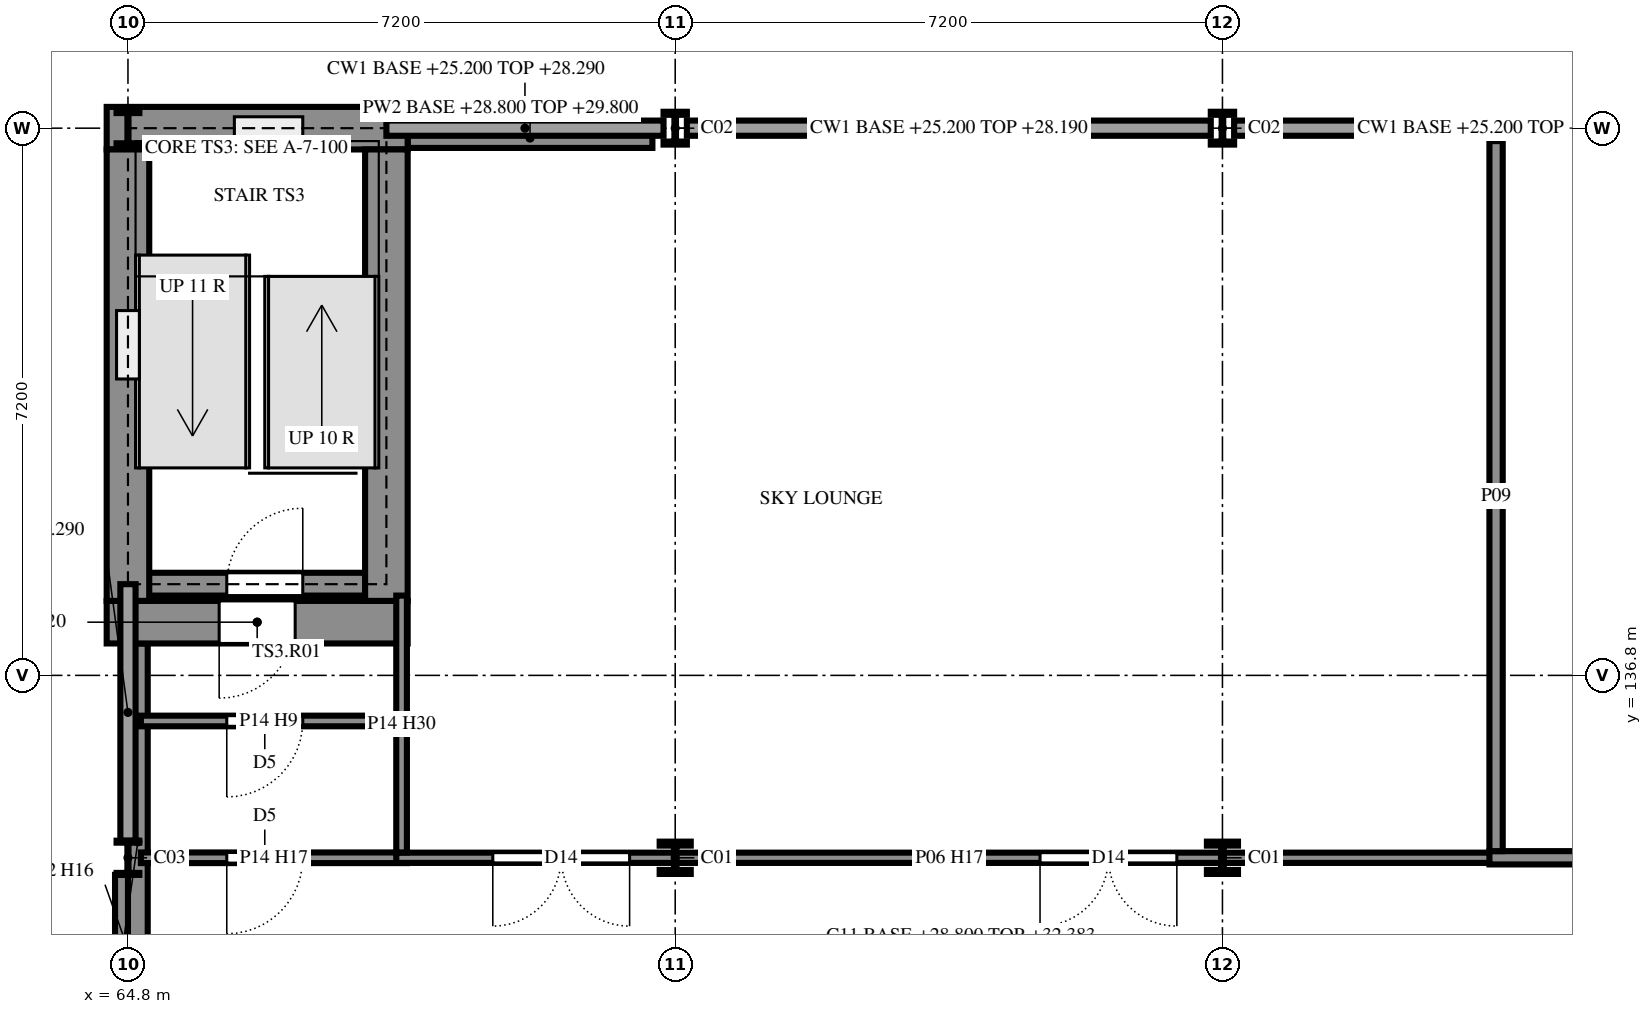
"""IFC4 building model, lengths in metres.
Left out: names, types, materials, properties, quantities, classifications, styles, units other than length and angle.
Written with IfcOpenShell. Run it as: python <this file> out.ifc"""

import sys

from ifc_helpers import new_model, si_unit, direction, frame, frame_2d, origin, origin_2d, place, context, subcontext, project, spatial, rectangle, i_section, extrude, element, fill, save


model = new_model("IFC4")
c1 = context("Model", 3, precision=1e-05, world=origin(), true_north=direction((0.0, 1.0)))
c2 = subcontext(c1, "Body", "Model", "MODEL_VIEW")
j1 = project(units=[si_unit("LENGTHUNIT", "METRE"), si_unit("PLANEANGLEUNIT", "RADIAN")], contexts=[c1])
p1 = place(None, origin())
s1 = spatial("IfcSite", under=j1, at=p1, CompositionType="ELEMENT")
p2 = place(p1, origin())
s2 = spatial("IfcBuilding", under=s1, at=p2, CompositionType="ELEMENT")
p3 = place(p2, frame((0.0, 0.0, 25.2)))
s3 = spatial("IfcBuildingStorey", under=s2, at=p3, CompositionType="ELEMENT", Elevation=25.2)
for number, where, z_axis, x_axis in (
    (1, (64.8, 134.4, 0.0), (0.0, 0.0, 1.0), (1.0, 0.0, 0.0)),
    (2, (64.8, 144.0, 0.0), (0.0, 0.0, 1.0), (1.0, 0.0, 0.0)),
):
    element("IfcColumn", number, at=place(p3, frame(where, z_axis=z_axis, x_axis=x_axis)), inside=s3, PredefinedType="COLUMN", context=c2, shape_type="SweptSolid", body=[
        extrude(i_section(OverallWidth=0.3, OverallDepth=0.45, WebThickness=0.014, FlangeThickness=0.026, FilletRadius=0.027, at=origin_2d()), origin(), (0.0, 0.0, 1.0), 3.6),
    ])
p4 = place(p3, frame((72.0, 134.4, 0.0), z_axis=(0.0, 0.0, 1.0), x_axis=(1.0, 0.0, 0.0)))
e3 = element("IfcColumn", 3, at=p4, inside=s3, PredefinedType="COLUMN", context=c2, shape_type="SweptSolid", body=[
    extrude(i_section(OverallWidth=0.409, OverallDepth=0.425, WebThickness=0.033, FlangeThickness=0.052, FilletRadius=0.015, at=origin_2d()), origin(), (0.0, 0.0, 1.0), 3.6),
])
p5 = place(p3, frame((72.0, 144.0, 0.0), z_axis=(0.0, 0.0, 1.0), x_axis=(1.0, 0.0, 0.0)))
e4 = element("IfcColumn", 4, at=p5, inside=s3, PredefinedType="COLUMN", context=c2, shape_type="SweptSolid", body=[
    extrude(i_section(OverallWidth=0.307, OverallDepth=0.432, WebThickness=0.021, FlangeThickness=0.04, FilletRadius=0.027, at=origin_2d()), origin(), (0.0, 0.0, 1.0), 3.6),
])
p6 = place(p3, frame((79.2, 134.4, 0.0), z_axis=(0.0, 0.0, 1.0), x_axis=(1.0, 0.0, 0.0)))
e5 = element("IfcColumn", 5, at=p6, inside=s3, PredefinedType="COLUMN", context=c2, shape_type="SweptSolid", body=[
    extrude(i_section(OverallWidth=0.409, OverallDepth=0.425, WebThickness=0.033, FlangeThickness=0.052, FilletRadius=0.015, at=origin_2d()), origin(), (0.0, 0.0, 1.0), 3.6),
])
p7 = place(p3, frame((79.2, 144.0, 0.0), z_axis=(0.0, 0.0, 1.0), x_axis=(1.0, 0.0, 0.0)))
e6 = element("IfcColumn", 6, at=p7, inside=s3, PredefinedType="COLUMN", context=c2, shape_type="SweptSolid", body=[
    extrude(i_section(OverallWidth=0.307, OverallDepth=0.432, WebThickness=0.021, FlangeThickness=0.04, FilletRadius=0.027, at=origin_2d()), origin(), (0.0, 0.0, 1.0), 3.6),
])
p8 = place(p3, frame((64.65, 138.0, 0.0), z_axis=(0.0, 0.0, 1.0), x_axis=(1.0, 0.0, 0.0)))
e7 = element("IfcWall", 7, at=p8, inside=s3, PredefinedType="SHEAR", context=c2, shape_type="SweptSolid", body=[
    extrude(rectangle(XDim=3.7, YDim=0.3, at=frame_2d((1.85, 0.0))), origin(), (0.0, 0.0, 1.0), 3.6),
])
p9 = place(p8, frame((1.45, 0.0, 0.0)))
e8 = element("IfcOpeningElement", 8, at=p9, cuts=e7, PredefinedType="OPENING", context=c2, shape_type="SweptSolid", body=[
    extrude(rectangle(XDim=1.0, YDim=2.1, at=frame_2d((0.5, 1.05))), frame((0.0, 0.16, 0.0), z_axis=(0.0, -1.0, 0.0), x_axis=(1.0, 0.0, 0.0)), (0.0, 0.0, 1.0), 0.32),
])
p10 = place(p3, frame((68.2, 137.85, 0.0), z_axis=(0.0, 0.0, 1.0), x_axis=(0.0, 1.0, 0.0)))
e9 = element("IfcWall", 9, at=p10, inside=s3, PredefinedType="SHEAR", context=c2, shape_type="SweptSolid", body=[
    extrude(rectangle(XDim=6.3, YDim=0.3, at=frame_2d((3.15, 0.0))), origin(), (0.0, 0.0, 1.0), 3.6),
])
p11 = place(p3, frame((64.8, 144.15, 0.0), z_axis=(0.0, 0.0, 1.0), x_axis=(0.0, -1.0, 0.0)))
e10 = element("IfcWall", 10, at=p11, inside=s3, PredefinedType="SHEAR", context=c2, shape_type="SweptSolid", body=[
    extrude(rectangle(XDim=6.3, YDim=0.3, at=frame_2d((3.15, 0.0))), origin(), (0.0, 0.0, 1.0), 3.6),
])
p12 = place(p11, frame((2.55, 0.0, 0.6)))
e11 = element("IfcOpeningElement", 11, at=p12, cuts=e10, PredefinedType="OPENING", context=c2, shape_type="SweptSolid", body=[
    extrude(rectangle(XDim=0.9, YDim=2.1, at=frame_2d((0.45, 1.05))), frame((0.0, 0.16, 0.0), z_axis=(0.0, -1.0, 0.0), x_axis=(1.0, 0.0, 0.0)), (0.0, 0.0, 1.0), 0.32),
])
p13 = place(p3, frame((68.35, 144.0, 0.0), z_axis=(0.0, 0.0, 1.0), x_axis=(-1.0, 0.0, 0.0)))
e12 = element("IfcWall", 12, at=p13, inside=s3, PredefinedType="SHEAR", context=c2, shape_type="SweptSolid", body=[
    extrude(rectangle(XDim=3.7, YDim=0.3, at=frame_2d((1.85, 0.0))), origin(), (0.0, 0.0, 1.0), 3.6),
])
p14 = place(p13, frame((1.25, 0.0, 0.6)))
e13 = element("IfcOpeningElement", 13, at=p14, cuts=e12, PredefinedType="OPENING", context=c2, shape_type="SweptSolid", body=[
    extrude(rectangle(XDim=0.9, YDim=2.1, at=frame_2d((0.45, 1.05))), frame((0.0, 0.16, 0.0), z_axis=(0.0, -1.0, 0.0), x_axis=(1.0, 0.0, 0.0)), (0.0, 0.0, 1.0), 0.32),
])
p15 = place(p3, frame((64.8, 134.175, 0.0), z_axis=(0.0, 0.0, 1.0), x_axis=(0.0, -1.0, 0.0)))
e14 = element("IfcWall", 14, at=p15, inside=s3, PredefinedType="SOLIDWALL", context=c2, shape_type="SweptSolid", body=[
    extrude(rectangle(XDim=1.95, YDim=0.34, at=frame_2d((0.975, 0.0))), origin(), (0.0, 0.0, 1.0), 3.09),
])
p16 = place(p3, frame((64.93, 132.0, 3.6), z_axis=(0.0, 0.0, 1.0), x_axis=(0.0, 1.0, 0.0)))
e15 = element("IfcWall", 15, at=p16, inside=s3, PredefinedType="PARAPET", context=c2, shape_type="SweptSolid", body=[
    extrude(rectangle(XDim=5.22, YDim=0.26, at=frame_2d((2.61, 0.0))), origin(), (0.0, 0.0, 1.0), 1.0),
])
p17 = place(p3, frame((68.48, 143.87, 3.6), z_axis=(0.0, 0.0, 1.0), x_axis=(1.0, 0.0, 0.0)))
e16 = element("IfcWall", 16, at=p17, inside=s3, PredefinedType="PARAPET", context=c2, shape_type="SweptSolid", body=[
    extrude(rectangle(XDim=3.22, YDim=0.26, at=frame_2d((1.61, 0.0))), origin(), (0.0, 0.0, 1.0), 1.0),
])
p18 = place(p3, frame((64.52, 137.5, 3.72), z_axis=(0.0, 0.0, 1.0), x_axis=(1.0, 0.0, 0.0)))
e17 = element("IfcWall", 17, at=p18, inside=s3, PredefinedType="SOLIDWALL", context=c2, shape_type="SweptSolid", body=[
    extrude(rectangle(XDim=3.96, YDim=0.56, at=frame_2d((1.98, 0.0))), origin(), (0.0, 0.0, 1.0), 2.7),
])
p19 = place(p18, frame((1.48, 0.0, 0.0)))
e18 = element("IfcOpeningElement", 18, at=p19, cuts=e17, PredefinedType="OPENING", context=c2, shape_type="SweptSolid", body=[
    extrude(rectangle(XDim=1.0, YDim=2.1, at=frame_2d((0.5, 1.05))), frame((0.0, 0.29, 0.0), z_axis=(0.0, -1.0, 0.0), x_axis=(1.0, 0.0, 0.0)), (0.0, 0.0, 1.0), 0.58),
])
p20 = place(p3, frame((64.52, 144.0, 3.72), z_axis=(0.0, 0.0, 1.0), x_axis=(1.0, 0.0, 0.0)))
e19 = element("IfcWall", 19, at=p20, inside=s3, PredefinedType="SOLIDWALL", context=c2, shape_type="SweptSolid", body=[
    extrude(rectangle(XDim=3.96, YDim=0.56, at=frame_2d((1.98, 0.0))), origin(), (0.0, 0.0, 1.0), 2.7),
])
for number, where, z_axis, x_axis in (
    (20, (64.8, 137.78, 3.72), (0.0, 0.0, 1.0), (0.0, 1.0, 0.0)),
    (21, (68.2, 137.78, 3.72), (0.0, 0.0, 1.0), (0.0, 1.0, 0.0)),
):
    element("IfcWall", number, at=place(p3, frame(where, z_axis=z_axis, x_axis=x_axis)), inside=s3, PredefinedType="SOLIDWALL", context=c2, shape_type="SweptSolid", body=[
        extrude(rectangle(XDim=5.94, YDim=0.56, at=frame_2d((2.97, 0.0))), origin(), (0.0, 0.0, 1.0), 2.7),
    ])
p21 = place(p3, frame((64.97, 134.4, 0.0), z_axis=(0.0, 0.0, 1.0), x_axis=(1.0, 0.0, 0.0)))
e22 = element("IfcWall", 22, at=p21, inside=s3, PredefinedType="PARTITIONING", context=c2, shape_type="SweptSolid", body=[
    extrude(rectangle(XDim=3.5, YDim=0.14, at=frame_2d((1.75, 0.0))), origin(), (0.0, 0.0, 1.0), 2.99),
])
p22 = place(p21, frame((1.13, 0.0, 0.0)))
e23 = element("IfcOpeningElement", 23, at=p22, cuts=e22, PredefinedType="OPENING", context=c2, shape_type="SweptSolid", body=[
    extrude(rectangle(XDim=1.0, YDim=2.1, at=frame_2d((0.5, 1.05))), frame((0.0, 0.08, 0.0), z_axis=(0.0, -1.0, 0.0), x_axis=(1.0, 0.0, 0.0)), (0.0, 0.0, 1.0), 0.16),
])
p23 = place(p3, frame((68.33, 134.4, 0.0), z_axis=(0.0, 0.0, 1.0), x_axis=(1.0, 0.0, 0.0)))
e24 = element("IfcWall", 24, at=p23, inside=s3, PredefinedType="PARTITIONING", context=c2, shape_type="SweptSolid", body=[
    extrude(rectangle(XDim=14.557, YDim=0.135, at=frame_2d((7.279, 0.0))), origin(), (0.0, 0.0, 1.0), 2.99),
])
p24 = place(p23, frame((1.27, 0.0, 0.0)))
e25 = element("IfcOpeningElement", 25, at=p24, cuts=e24, PredefinedType="OPENING", context=c2, shape_type="SweptSolid", body=[
    extrude(rectangle(XDim=1.8, YDim=2.1, at=frame_2d((0.9, 1.05))), frame((0.0, 0.077, 0.0), z_axis=(0.0, -1.0, 0.0), x_axis=(1.0, 0.0, 0.0)), (0.0, 0.0, 1.0), 0.155),
])
p25 = place(p23, frame((8.47, 0.0, 0.0)))
e26 = element("IfcOpeningElement", 26, at=p25, cuts=e24, PredefinedType="OPENING", context=c2, shape_type="SweptSolid", body=[
    extrude(rectangle(XDim=1.8, YDim=2.1, at=frame_2d((0.9, 1.05))), frame((0.0, 0.077, 0.0), z_axis=(0.0, -1.0, 0.0), x_axis=(1.0, 0.0, 0.0)), (0.0, 0.0, 1.0), 0.155),
])
p26 = place(p3, frame((82.712, 134.4, 0.0), z_axis=(0.0, 0.0, 1.0), x_axis=(1.0, 0.0, 0.0)))
e27 = element("IfcWall", 27, at=p26, inside=s3, PredefinedType="PARTITIONING", context=c2, shape_type="SweptSolid", body=[
    extrude(rectangle(XDim=3.775, YDim=0.175, at=frame_2d((1.888, 0.0))), origin(), (0.0, 0.0, 1.0), 2.99),
])
p27 = place(p26, frame((1.387, 0.0, 0.0)))
e28 = element("IfcOpeningElement", 28, at=p27, cuts=e27, PredefinedType="OPENING", context=c2, shape_type="SweptSolid", body=[
    extrude(rectangle(XDim=1.0, YDim=2.4, at=frame_2d((0.5, 1.2))), frame((0.0, 0.097, 0.0), z_axis=(0.0, -1.0, 0.0), x_axis=(1.0, 0.0, 0.0)), (0.0, 0.0, 1.0), 0.195),
])
p28 = place(p3, frame((64.97, 136.2, 0.0), z_axis=(0.0, 0.0, 1.0), x_axis=(1.0, 0.0, 0.0)))
e29 = element("IfcWall", 29, at=p28, inside=s3, PredefinedType="PARTITIONING", context=c2, shape_type="SweptSolid", body=[
    extrude(rectangle(XDim=3.36, YDim=0.14, at=frame_2d((1.68, 0.0))), origin(), (0.0, 0.0, 1.0), 3.29),
])
p29 = place(p28, frame((1.13, 0.0, 0.0)))
e30 = element("IfcOpeningElement", 30, at=p29, cuts=e29, PredefinedType="OPENING", context=c2, shape_type="SweptSolid", body=[
    extrude(rectangle(XDim=1.0, YDim=2.1, at=frame_2d((0.5, 1.05))), frame((0.0, 0.08, 0.0), z_axis=(0.0, -1.0, 0.0), x_axis=(1.0, 0.0, 0.0)), (0.0, 0.0, 1.0), 0.16),
])
p30 = place(p3, frame((68.4, 134.47, 0.0), z_axis=(0.0, 0.0, 1.0), x_axis=(0.0, 1.0, 0.0)))
e31 = element("IfcWall", 31, at=p30, inside=s3, PredefinedType="PARTITIONING", context=c2, shape_type="SweptSolid", body=[
    extrude(rectangle(XDim=3.38, YDim=0.14, at=frame_2d((1.69, 0.0))), origin(), (0.0, 0.0, 1.0), 2.89),
])
p31 = place(p3, frame((82.8, 134.488, 0.0), z_axis=(0.0, 0.0, 1.0), x_axis=(0.0, 1.0, 0.0)))
e32 = element("IfcWall", 32, at=p31, inside=s3, PredefinedType="PARTITIONING", context=c2, shape_type="SweptSolid", body=[
    extrude(rectangle(XDim=9.343, YDim=0.175, at=frame_2d((4.671, 0.0))), origin(), (0.0, 0.0, 1.0), 2.89),
])
p32 = place(p14, origin())
e33 = element("IfcWindow", 33, at=p32, inside=s3, PartitioningType="SINGLE_PANEL", PredefinedType="WINDOW", context=c2, shape_type="SweptSolid", body=[
    extrude(rectangle(XDim=0.9, YDim=2.1, at=frame_2d((0.45, 1.05))), frame((0.0, 0.03, 0.0), z_axis=(0.0, -1.0, 0.0), x_axis=(1.0, 0.0, 0.0)), (0.0, 0.0, 1.0), 0.06),
])
fill(e13, e33)
p33 = place(p12, origin())
e34 = element("IfcWindow", 34, at=p33, inside=s3, PartitioningType="SINGLE_PANEL", PredefinedType="WINDOW", context=c2, shape_type="SweptSolid", body=[
    extrude(rectangle(XDim=0.9, YDim=2.1, at=frame_2d((0.45, 1.05))), frame((0.0, 0.03, 0.0), z_axis=(0.0, -1.0, 0.0), x_axis=(1.0, 0.0, 0.0)), (0.0, 0.0, 1.0), 0.06),
])
fill(e11, e34)
p34 = place(p19, frame((1.0, 0.0, 0.0), z_axis=(0.0, 0.0, 1.0), x_axis=(-1.0, 0.0, 0.0)))
e35 = element("IfcDoor", 35, at=p34, inside=s3, OperationType="SINGLE_SWING_LEFT", PredefinedType="DOOR", context=c2, shape_type="SweptSolid", body=[
    extrude(rectangle(XDim=1.0, YDim=2.1, at=frame_2d((0.5, 1.05))), frame((0.0, 0.025, 0.0), z_axis=(0.0, -1.0, 0.0), x_axis=(1.0, 0.0, 0.0)), (0.0, 0.0, 1.0), 0.05),
])
fill(e18, e35)
p35 = place(p22, frame((1.0, 0.0, 0.0), z_axis=(0.0, 0.0, 1.0), x_axis=(-1.0, 0.0, 0.0)))
e36 = element("IfcDoor", 36, at=p35, inside=s3, OperationType="SINGLE_SWING_LEFT", PredefinedType="DOOR", context=c2, shape_type="SweptSolid", body=[
    extrude(rectangle(XDim=1.0, YDim=2.1, at=frame_2d((0.5, 1.05))), frame((0.0, 0.025, 0.0), z_axis=(0.0, -1.0, 0.0), x_axis=(1.0, 0.0, 0.0)), (0.0, 0.0, 1.0), 0.05),
])
fill(e23, e36)
p36 = place(p24, frame((1.8, 0.0, 0.0), z_axis=(0.0, 0.0, 1.0), x_axis=(-1.0, 0.0, 0.0)))
e37 = element("IfcDoor", 37, at=p36, inside=s3, OperationType="DOUBLE_DOOR_SINGLE_SWING", PredefinedType="DOOR", context=c2, shape_type="SweptSolid", body=[
    extrude(rectangle(XDim=1.8, YDim=2.1, at=frame_2d((0.9, 1.05))), frame((0.0, 0.025, 0.0), z_axis=(0.0, -1.0, 0.0), x_axis=(1.0, 0.0, 0.0)), (0.0, 0.0, 1.0), 0.05),
])
fill(e25, e37)
p37 = place(p25, frame((1.8, 0.0, 0.0), z_axis=(0.0, 0.0, 1.0), x_axis=(-1.0, 0.0, 0.0)))
e38 = element("IfcDoor", 38, at=p37, inside=s3, OperationType="DOUBLE_DOOR_SINGLE_SWING", PredefinedType="DOOR", context=c2, shape_type="SweptSolid", body=[
    extrude(rectangle(XDim=1.8, YDim=2.1, at=frame_2d((0.9, 1.05))), frame((0.0, 0.025, 0.0), z_axis=(0.0, -1.0, 0.0), x_axis=(1.0, 0.0, 0.0)), (0.0, 0.0, 1.0), 0.05),
])
fill(e26, e38)
p38 = place(p29, frame((1.0, 0.0, 0.0), z_axis=(0.0, 0.0, 1.0), x_axis=(-1.0, 0.0, 0.0)))
e39 = element("IfcDoor", 39, at=p38, inside=s3, OperationType="SINGLE_SWING_LEFT", PredefinedType="DOOR", context=c2, shape_type="SweptSolid", body=[
    extrude(rectangle(XDim=1.0, YDim=2.1, at=frame_2d((0.5, 1.05))), frame((0.0, 0.025, 0.0), z_axis=(0.0, -1.0, 0.0), x_axis=(1.0, 0.0, 0.0)), (0.0, 0.0, 1.0), 0.05),
])
fill(e30, e39)
p39 = place(p9, origin())
e40 = element("IfcDoor", 40, at=p39, inside=s3, OperationType="SINGLE_SWING_LEFT", PredefinedType="DOOR", context=c2, shape_type="SweptSolid", body=[
    extrude(rectangle(XDim=1.0, YDim=2.1, at=frame_2d((0.5, 1.05))), frame((0.0, 0.025, 0.0), z_axis=(0.0, -1.0, 0.0), x_axis=(1.0, 0.0, 0.0)), (0.0, 0.0, 1.0), 0.05),
])
fill(e8, e40)
save(model, sys.argv[1])
